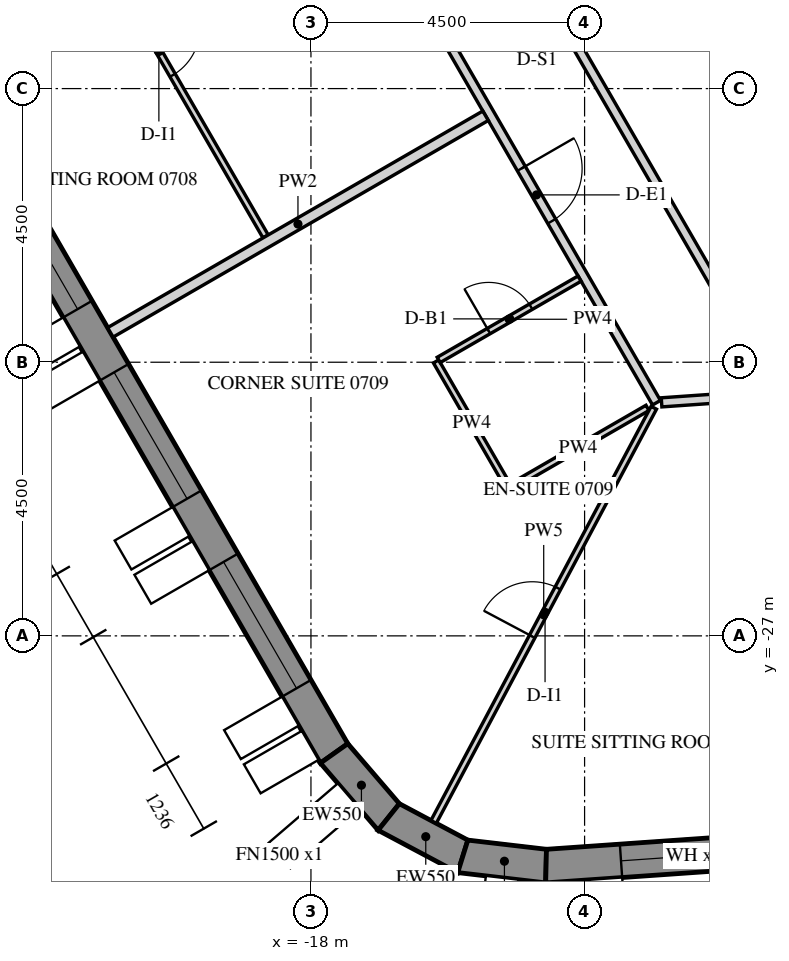
"""IFC4 building model, lengths in metres.
Left out: names, types, materials, properties, quantities, classifications, styles, units other than length and angle.
Written with IfcOpenShell. Run it as: python <this file> out.ifc"""

import sys

from ifc_helpers import new_model, si_unit, direction, frame, frame_2d, origin, place, context, subcontext, project, spatial, polyline, rectangle, outline, extrude, element, fill, save


model = new_model("IFC4")
c1 = context("Model", 3, precision=1e-05, world=origin(), true_north=direction((0.0, 1.0)))
c2 = subcontext(c1, "Body", "Model", "MODEL_VIEW")
j1 = project(units=[si_unit("LENGTHUNIT", "METRE"), si_unit("PLANEANGLEUNIT", "RADIAN")], contexts=[c1])
p1 = place(None, origin())
s1 = spatial("IfcSite", under=j1, at=p1, CompositionType="ELEMENT")
p2 = place(p1, origin())
s2 = spatial("IfcBuilding", under=s1, at=p2, CompositionType="ELEMENT")
p3 = place(p2, frame((0.0, 0.0, 99.9)))
s3 = spatial("IfcBuildingStorey", under=s2, at=p3, CompositionType="ELEMENT", Elevation=99.9)
p4 = place(p3, frame((-32.655, -2.89, -0.15), z_axis=(0.0, 0.0, 1.0), x_axis=(0.499997711317, -0.866026725152, 0.0)))
e1 = element("IfcWall", 1, at=p4, inside=s3, PredefinedType="SOLIDWALL", context=c2, shape_type="SweptSolid", body=[
    extrude(outline(polyline([(-0.022, -0.275), (30.097, -0.275), (30.045, 0.275), (0.022, 0.275), (-0.022, -0.275)])), origin(), (0.0, 0.0, 1.0), 3.9),
])
p5 = place(p4, frame((1.236, 0.0, 1.05)))
e2 = element("IfcOpeningElement", 2, at=p5, cuts=e1, PredefinedType="OPENING", context=c2, shape_type="SweptSolid", body=[
    extrude(rectangle(XDim=2.4, YDim=2.4, at=frame_2d((1.2, 1.2))), frame((0.0, 0.285, 0.0), z_axis=(0.0, -1.0, 0.0), x_axis=(1.0, 0.0, 0.0)), (0.0, 0.0, 1.0), 0.57),
])
p6 = place(p4, frame((4.835, 0.0, 1.05)))
e3 = element("IfcOpeningElement", 3, at=p6, cuts=e1, PredefinedType="OPENING", context=c2, shape_type="SweptSolid", body=[
    extrude(rectangle(XDim=2.4, YDim=2.4, at=frame_2d((1.2, 1.2))), frame((0.0, 0.285, 0.0), z_axis=(0.0, -1.0, 0.0), x_axis=(1.0, 0.0, 0.0)), (0.0, 0.0, 1.0), 0.57),
])
p7 = place(p4, frame((8.436, 0.0, 1.05)))
e4 = element("IfcOpeningElement", 4, at=p7, cuts=e1, PredefinedType="OPENING", context=c2, shape_type="SweptSolid", body=[
    extrude(rectangle(XDim=2.4, YDim=2.4, at=frame_2d((1.2, 1.2))), frame((0.0, 0.285, 0.0), z_axis=(0.0, -1.0, 0.0), x_axis=(1.0, 0.0, 0.0)), (0.0, 0.0, 1.0), 0.57),
])
p8 = place(p4, frame((12.035, 0.0, 1.05)))
e5 = element("IfcOpeningElement", 5, at=p8, cuts=e1, PredefinedType="OPENING", context=c2, shape_type="SweptSolid", body=[
    extrude(rectangle(XDim=2.4, YDim=2.4, at=frame_2d((1.2, 1.2))), frame((0.0, 0.285, 0.0), z_axis=(0.0, -1.0, 0.0), x_axis=(1.0, 0.0, 0.0)), (0.0, 0.0, 1.0), 0.57),
])
p9 = place(p4, frame((15.635, 0.0, 1.05)))
e6 = element("IfcOpeningElement", 6, at=p9, cuts=e1, PredefinedType="OPENING", context=c2, shape_type="SweptSolid", body=[
    extrude(rectangle(XDim=2.4, YDim=2.4, at=frame_2d((1.2, 1.2))), frame((0.0, 0.285, 0.0), z_axis=(0.0, -1.0, 0.0), x_axis=(1.0, 0.0, 0.0)), (0.0, 0.0, 1.0), 0.57),
])
p10 = place(p4, frame((19.236, 0.0, 1.05)))
e7 = element("IfcOpeningElement", 7, at=p10, cuts=e1, PredefinedType="OPENING", context=c2, shape_type="SweptSolid", body=[
    extrude(rectangle(XDim=2.4, YDim=2.4, at=frame_2d((1.2, 1.2))), frame((0.0, 0.285, 0.0), z_axis=(0.0, -1.0, 0.0), x_axis=(1.0, 0.0, 0.0)), (0.0, 0.0, 1.0), 0.57),
])
p11 = place(p4, frame((22.835, 0.0, 1.05)))
e8 = element("IfcOpeningElement", 8, at=p11, cuts=e1, PredefinedType="OPENING", context=c2, shape_type="SweptSolid", body=[
    extrude(rectangle(XDim=2.4, YDim=2.4, at=frame_2d((1.2, 1.2))), frame((0.0, 0.285, 0.0), z_axis=(0.0, -1.0, 0.0), x_axis=(1.0, 0.0, 0.0)), (0.0, 0.0, 1.0), 0.57),
])
p12 = place(p4, frame((26.436, 0.0, 1.05)))
e9 = element("IfcOpeningElement", 9, at=p12, cuts=e1, PredefinedType="OPENING", context=c2, shape_type="SweptSolid", body=[
    extrude(rectangle(XDim=2.4, YDim=2.4, at=frame_2d((1.2, 1.2))), frame((0.0, 0.285, 0.0), z_axis=(0.0, -1.0, 0.0), x_axis=(1.0, 0.0, 0.0)), (0.0, 0.0, 1.0), 0.57),
])
p13 = place(p3, frame((-17.619, -28.932, -0.15), z_axis=(0.0, 0.0, 1.0), x_axis=(0.651621950847, -0.758543890078, 0.0)))
e10 = element("IfcWall", 10, at=p13, inside=s3, PredefinedType="SOLIDWALL", context=c2, shape_type="SweptSolid", body=[
    extrude(outline(polyline([(-0.026, -0.275), (1.431, -0.275), (1.327, 0.275), (0.026, 0.275), (-0.026, -0.275)])), origin(), (0.0, 0.0, 1.0), 3.9),
])
p14 = place(p3, frame((-16.721, -29.979, -0.15), z_axis=(0.0, 0.0, 1.0), x_axis=(0.882994189209, -0.469383917304, 0.0)))
e11 = element("IfcWall", 11, at=p14, inside=s3, PredefinedType="SOLIDWALL", context=c2, shape_type="SweptSolid", body=[
    extrude(outline(polyline([(-0.052, -0.275), (1.431, -0.275), (1.327, 0.275), (0.052, 0.275), (-0.052, -0.275)])), origin(), (0.0, 0.0, 1.0), 3.9),
])
p15 = place(p3, frame((-15.503, -30.626, -0.15), z_axis=(0.0, 0.0, 1.0), x_axis=(0.993232537394, -0.11614269956, 0.0)))
e12 = element("IfcWall", 12, at=p15, inside=s3, PredefinedType="SOLIDWALL", context=c2, shape_type="SweptSolid", body=[
    extrude(outline(polyline([(-0.052, -0.275), (1.405, -0.275), (1.353, 0.275), (0.052, 0.275), (-0.052, -0.275)])), origin(), (0.0, 0.0, 1.0), 3.9),
])
p16 = place(p3, frame((-14.134, -30.786, -0.15), z_axis=(0.0, 0.0, 1.0), x_axis=(0.997564037441, 0.069756657061, 0.0)))
e13 = element("IfcWall", 13, at=p16, inside=s3, PredefinedType="SOLIDWALL", context=c2, shape_type="SweptSolid", body=[
    extrude(outline(polyline([(-0.026, -0.275), (30.094, -0.275), (30.049, 0.275), (0.026, 0.275), (-0.026, -0.275)])), origin(), (0.0, 0.0, 1.0), 3.9),
])
p17 = place(p16, frame((1.236, 0.0, 1.05)))
e14 = element("IfcOpeningElement", 14, at=p17, cuts=e13, PredefinedType="OPENING", context=c2, shape_type="SweptSolid", body=[
    extrude(rectangle(XDim=2.4, YDim=2.4, at=frame_2d((1.2, 1.2))), frame((0.0, 0.285, 0.0), z_axis=(0.0, -1.0, 0.0), x_axis=(1.0, 0.0, 0.0)), (0.0, 0.0, 1.0), 0.57),
])
p18 = place(p16, frame((4.835, 0.0, 1.05)))
e15 = element("IfcOpeningElement", 15, at=p18, cuts=e13, PredefinedType="OPENING", context=c2, shape_type="SweptSolid", body=[
    extrude(rectangle(XDim=2.4, YDim=2.4, at=frame_2d((1.2, 1.2))), frame((0.0, 0.285, 0.0), z_axis=(0.0, -1.0, 0.0), x_axis=(1.0, 0.0, 0.0)), (0.0, 0.0, 1.0), 0.57),
])
p19 = place(p16, frame((8.436, 0.0, 1.05)))
e16 = element("IfcOpeningElement", 16, at=p19, cuts=e13, PredefinedType="OPENING", context=c2, shape_type="SweptSolid", body=[
    extrude(rectangle(XDim=2.4, YDim=2.4, at=frame_2d((1.2, 1.2))), frame((0.0, 0.285, 0.0), z_axis=(0.0, -1.0, 0.0), x_axis=(1.0, 0.0, 0.0)), (0.0, 0.0, 1.0), 0.57),
])
p20 = place(p16, frame((12.035, 0.0, 1.05)))
e17 = element("IfcOpeningElement", 17, at=p20, cuts=e13, PredefinedType="OPENING", context=c2, shape_type="SweptSolid", body=[
    extrude(rectangle(XDim=2.4, YDim=2.4, at=frame_2d((1.2, 1.2))), frame((0.0, 0.285, 0.0), z_axis=(0.0, -1.0, 0.0), x_axis=(1.0, 0.0, 0.0)), (0.0, 0.0, 1.0), 0.57),
])
p21 = place(p16, frame((15.635, 0.0, 1.05)))
e18 = element("IfcOpeningElement", 18, at=p21, cuts=e13, PredefinedType="OPENING", context=c2, shape_type="SweptSolid", body=[
    extrude(rectangle(XDim=2.4, YDim=2.4, at=frame_2d((1.2, 1.2))), frame((0.0, 0.285, 0.0), z_axis=(0.0, -1.0, 0.0), x_axis=(1.0, 0.0, 0.0)), (0.0, 0.0, 1.0), 0.57),
])
p22 = place(p16, frame((19.236, 0.0, 1.05)))
e19 = element("IfcOpeningElement", 19, at=p22, cuts=e13, PredefinedType="OPENING", context=c2, shape_type="SweptSolid", body=[
    extrude(rectangle(XDim=2.4, YDim=2.4, at=frame_2d((1.2, 1.2))), frame((0.0, 0.285, 0.0), z_axis=(0.0, -1.0, 0.0), x_axis=(1.0, 0.0, 0.0)), (0.0, 0.0, 1.0), 0.57),
])
p23 = place(p16, frame((22.835, 0.0, 1.05)))
e20 = element("IfcOpeningElement", 20, at=p23, cuts=e13, PredefinedType="OPENING", context=c2, shape_type="SweptSolid", body=[
    extrude(rectangle(XDim=2.4, YDim=2.4, at=frame_2d((1.2, 1.2))), frame((0.0, 0.285, 0.0), z_axis=(0.0, -1.0, 0.0), x_axis=(1.0, 0.0, 0.0)), (0.0, 0.0, 1.0), 0.57),
])
p24 = place(p16, frame((26.436, 0.0, 1.05)))
e21 = element("IfcOpeningElement", 21, at=p24, cuts=e13, PredefinedType="OPENING", context=c2, shape_type="SweptSolid", body=[
    extrude(rectangle(XDim=2.4, YDim=2.4, at=frame_2d((1.2, 1.2))), frame((0.0, 0.285, 0.0), z_axis=(0.0, -1.0, 0.0), x_axis=(1.0, 0.0, 0.0)), (0.0, 0.0, 1.0), 0.57),
])
p25 = place(p3, frame((-24.436, -2.175, 0.0), z_axis=(0.0, 0.0, 1.0), x_axis=(0.499996816197, -0.866027241946, 0.0)))
e22 = element("IfcWall", 22, at=p25, inside=s3, PredefinedType="PARTITIONING", context=c2, shape_type="SweptSolid", body=[
    extrude(rectangle(XDim=24.238, YDim=0.15, at=frame_2d((12.119, 0.0))), origin(), (0.0, 0.0, 1.0), 2.988),
])
p26 = place(p25, frame((0.179, 0.0, 0.0)))
e23 = element("IfcOpeningElement", 23, at=p26, cuts=e22, PredefinedType="OPENING", context=c2, shape_type="SweptSolid", body=[
    extrude(rectangle(XDim=1.0, YDim=2.1, at=frame_2d((0.5, 1.05))), frame((0.0, 0.085, 0.0), z_axis=(0.0, -1.0, 0.0), x_axis=(1.0, 0.0, 0.0)), (0.0, 0.0, 1.0), 0.17),
])
p27 = place(p25, frame((12.246, 0.0, 0.0)))
e24 = element("IfcOpeningElement", 24, at=p27, cuts=e22, PredefinedType="OPENING", context=c2, shape_type="SweptSolid", body=[
    extrude(rectangle(XDim=1.0, YDim=2.1, at=frame_2d((0.5, 1.05))), frame((0.0, 0.085, 0.0), z_axis=(0.0, -1.0, 0.0), x_axis=(1.0, 0.0, 0.0)), (0.0, 0.0, 1.0), 0.17),
])
p28 = place(p25, frame((19.792, 0.0, 0.0)))
e25 = element("IfcOpeningElement", 25, at=p28, cuts=e22, PredefinedType="OPENING", context=c2, shape_type="SweptSolid", body=[
    extrude(rectangle(XDim=1.0, YDim=2.1, at=frame_2d((0.5, 1.05))), frame((0.0, 0.085, 0.0), z_axis=(0.0, -1.0, 0.0), x_axis=(1.0, 0.0, 0.0)), (0.0, 0.0, 1.0), 0.17),
])
p29 = place(p3, frame((-12.234, -23.16, 0.0), z_axis=(0.0, 0.0, 1.0), x_axis=(0.997563845372, 0.069759403714, 0.0)))
e26 = element("IfcWall", 26, at=p29, inside=s3, PredefinedType="PARTITIONING", context=c2, shape_type="SweptSolid", body=[
    extrude(rectangle(XDim=22.335, YDim=0.15, at=frame_2d((11.168, 0.0))), origin(), (0.0, 0.0, 1.0), 2.988),
])
p30 = place(p29, frame((5.409, 0.0, 0.0)))
e27 = element("IfcOpeningElement", 27, at=p30, cuts=e26, PredefinedType="OPENING", context=c2, shape_type="SweptSolid", body=[
    extrude(rectangle(XDim=1.0, YDim=2.1, at=frame_2d((0.5, 1.05))), frame((0.0, 0.085, 0.0), z_axis=(0.0, -1.0, 0.0), x_axis=(1.0, 0.0, 0.0)), (0.0, 0.0, 1.0), 0.17),
])
p31 = place(p29, frame((18.272, 0.0, 0.0)))
e28 = element("IfcOpeningElement", 28, at=p31, cuts=e26, PredefinedType="OPENING", context=c2, shape_type="SweptSolid", body=[
    extrude(rectangle(XDim=1.0, YDim=2.1, at=frame_2d((0.5, 1.05))), frame((0.0, 0.085, 0.0), z_axis=(0.0, -1.0, 0.0), x_axis=(1.0, 0.0, 0.0)), (0.0, 0.0, 1.0), 0.17),
])
p32 = place(p3, frame((-11.363, -21.219, 0.0), z_axis=(0.0, 0.0, 1.0), x_axis=(-0.50001451402, 0.866017023949, 0.0)))
e29 = element("IfcWall", 29, at=p32, inside=s3, PredefinedType="PARTITIONING", context=c2, shape_type="SweptSolid", body=[
    extrude(rectangle(XDim=11.674, YDim=0.15, at=frame_2d((5.837, 0.0))), origin(), (0.0, 0.0, 1.0), 2.988),
])
p33 = place(p32, frame((5.387, 0.0, 0.0)))
e30 = element("IfcOpeningElement", 30, at=p33, cuts=e29, PredefinedType="OPENING", context=c2, shape_type="SweptSolid", body=[
    extrude(rectangle(XDim=0.9, YDim=2.1, at=frame_2d((0.45, 1.05))), frame((0.0, 0.085, 0.0), z_axis=(0.0, -1.0, 0.0), x_axis=(1.0, 0.0, 0.0)), (0.0, 0.0, 1.0), 0.17),
])
p34 = place(p3, frame((-22.276, -14.317, 0.0), z_axis=(0.0, 0.0, 1.0), x_axis=(0.500010820671, -0.866019156377, 0.0)))
e31 = element("IfcWall", 31, at=p34, inside=s3, PredefinedType="PARTITIONING", context=c2, shape_type="SweptSolid", body=[
    extrude(rectangle(XDim=7.06, YDim=0.1, at=frame_2d((3.53, 0.0))), origin(), (0.0, 0.0, 1.0), 2.988),
])
p35 = place(p34, frame((3.1, 0.0, 0.0)))
e32 = element("IfcOpeningElement", 32, at=p35, cuts=e31, PredefinedType="OPENING", context=c2, shape_type="SweptSolid", body=[
    extrude(rectangle(XDim=0.9, YDim=2.1, at=frame_2d((0.45, 1.05))), frame((0.0, 0.06, 0.0), z_axis=(0.0, -1.0, 0.0), x_axis=(1.0, 0.0, 0.0)), (0.0, 0.0, 1.0), 0.12),
])
p36 = place(p3, frame((-21.299, -22.009, 0.0), z_axis=(0.0, 0.0, 1.0), x_axis=(0.866024672353, 0.500001266874, 0.0)))
e33 = element("IfcWall", 33, at=p36, inside=s3, PredefinedType="PARTITIONING", context=c2, shape_type="SweptSolid", body=[
    extrude(rectangle(XDim=7.125, YDim=0.18, at=frame_2d((3.562, 0.0))), origin(), (0.0, 0.0, 1.0), 2.988),
])
p37 = place(p3, frame((-12.466, -23.251, 0.0), z_axis=(0.0, 0.0, 1.0), x_axis=(-0.866017009382, -0.50001453925, 0.0)))
e34 = element("IfcWall", 34, at=p37, inside=s3, PredefinedType="PARTITIONING", context=c2, shape_type="SweptSolid", body=[
    extrude(rectangle(XDim=2.629, YDim=0.1, at=frame_2d((1.314, 0.0))), origin(), (0.0, 0.0, 1.0), 2.988),
])
p38 = place(p3, frame((-14.767, -24.522, 0.0), z_axis=(0.0, 0.0, 1.0), x_axis=(-0.499938297808, 0.866061024631, 0.0)))
e35 = element("IfcWall", 35, at=p38, inside=s3, PredefinedType="PARTITIONING", context=c2, shape_type="SweptSolid", body=[
    extrude(rectangle(XDim=2.35, YDim=0.1, at=frame_2d((1.175, 0.0))), origin(), (0.0, 0.0, 1.0), 2.988),
])
p39 = place(p3, frame((-15.899, -22.462, 0.0), z_axis=(0.0, 0.0, 1.0), x_axis=(0.86604424267, 0.499967368674, 0.0)))
e36 = element("IfcWall", 36, at=p39, inside=s3, PredefinedType="PARTITIONING", context=c2, shape_type="SweptSolid", body=[
    extrude(rectangle(XDim=2.675, YDim=0.1, at=frame_2d((1.337, 0.0))), origin(), (0.0, 0.0, 1.0), 2.988),
])
p40 = place(p39, frame((0.95, 0.0, 0.0)))
e37 = element("IfcOpeningElement", 37, at=p40, cuts=e36, PredefinedType="OPENING", context=c2, shape_type="SweptSolid", body=[
    extrude(rectangle(XDim=0.8, YDim=2.1, at=frame_2d((0.4, 1.05))), frame((0.0, 0.06, 0.0), z_axis=(0.0, -1.0, 0.0), x_axis=(1.0, 0.0, 0.0)), (0.0, 0.0, 1.0), 0.12),
])
p41 = place(p3, frame((-15.983, -30.059, 0.0), z_axis=(0.0, 0.0, 1.0), x_axis=(0.469495384778, 0.882934926069, 0.0)))
e38 = element("IfcWall", 38, at=p41, inside=s3, PredefinedType="PARTITIONING", context=c2, shape_type="SweptSolid", body=[
    extrude(rectangle(XDim=7.713, YDim=0.1, at=frame_2d((3.856, 0.0))), origin(), (0.0, 0.0, 1.0), 2.988),
])
p42 = place(p41, frame((3.454, 0.0, 0.0)))
e39 = element("IfcOpeningElement", 39, at=p42, cuts=e38, PredefinedType="OPENING", context=c2, shape_type="SweptSolid", body=[
    extrude(rectangle(XDim=0.9, YDim=2.1, at=frame_2d((0.45, 1.05))), frame((0.0, 0.06, 0.0), z_axis=(0.0, -1.0, 0.0), x_axis=(1.0, 0.0, 0.0)), (0.0, 0.0, 1.0), 0.12),
])
p43 = place(p10, frame((0.0, 0.205, 0.0)))
e40 = element("IfcWindow", 40, at=p43, inside=s3, PartitioningType="DOUBLE_PANEL_VERTICAL", PredefinedType="WINDOW", context=c2, shape_type="SweptSolid", body=[
    extrude(rectangle(XDim=2.4, YDim=2.4, at=frame_2d((1.2, 1.2))), frame((0.0, 0.03, 0.0), z_axis=(0.0, -1.0, 0.0), x_axis=(1.0, 0.0, 0.0)), (0.0, 0.0, 1.0), 0.06),
])
fill(e7, e40)
p44 = place(p11, frame((0.0, 0.205, 0.0)))
e41 = element("IfcWindow", 41, at=p44, inside=s3, PartitioningType="DOUBLE_PANEL_VERTICAL", PredefinedType="WINDOW", context=c2, shape_type="SweptSolid", body=[
    extrude(rectangle(XDim=2.4, YDim=2.4, at=frame_2d((1.2, 1.2))), frame((0.0, 0.03, 0.0), z_axis=(0.0, -1.0, 0.0), x_axis=(1.0, 0.0, 0.0)), (0.0, 0.0, 1.0), 0.06),
])
fill(e8, e41)
p45 = place(p12, frame((0.0, 0.205, 0.0)))
e42 = element("IfcWindow", 42, at=p45, inside=s3, PartitioningType="DOUBLE_PANEL_VERTICAL", PredefinedType="WINDOW", context=c2, shape_type="SweptSolid", body=[
    extrude(rectangle(XDim=2.4, YDim=2.4, at=frame_2d((1.2, 1.2))), frame((0.0, 0.03, 0.0), z_axis=(0.0, -1.0, 0.0), x_axis=(1.0, 0.0, 0.0)), (0.0, 0.0, 1.0), 0.06),
])
fill(e9, e42)
p46 = place(p17, frame((0.0, 0.205, 0.0)))
e43 = element("IfcWindow", 43, at=p46, inside=s3, PartitioningType="DOUBLE_PANEL_VERTICAL", PredefinedType="WINDOW", context=c2, shape_type="SweptSolid", body=[
    extrude(rectangle(XDim=2.4, YDim=2.4, at=frame_2d((1.2, 1.2))), frame((0.0, 0.03, 0.0), z_axis=(0.0, -1.0, 0.0), x_axis=(1.0, 0.0, 0.0)), (0.0, 0.0, 1.0), 0.06),
])
fill(e14, e43)
p47 = place(p35, origin())
e44 = element("IfcDoor", 44, at=p47, inside=s3, OperationType="SINGLE_SWING_LEFT", PredefinedType="DOOR", context=c2, shape_type="SweptSolid", body=[
    extrude(rectangle(XDim=0.9, YDim=2.1, at=frame_2d((0.45, 1.05))), frame((0.0, 0.025, 0.0), z_axis=(0.0, -1.0, 0.0), x_axis=(1.0, 0.0, 0.0)), (0.0, 0.0, 1.0), 0.05),
])
fill(e32, e44)
p48 = place(p28, origin())
e45 = element("IfcDoor", 45, at=p48, inside=s3, OperationType="SINGLE_SWING_RIGHT", PredefinedType="DOOR", context=c2, shape_type="SweptSolid", body=[
    extrude(rectangle(XDim=1.0, YDim=2.1, at=frame_2d((0.5, 1.05))), frame((0.0, 0.025, 0.0), z_axis=(0.0, -1.0, 0.0), x_axis=(1.0, 0.0, 0.0)), (0.0, 0.0, 1.0), 0.05),
])
fill(e25, e45)
p49 = place(p40, origin())
e46 = element("IfcDoor", 46, at=p49, inside=s3, OperationType="SINGLE_SWING_RIGHT", PredefinedType="DOOR", context=c2, shape_type="SweptSolid", body=[
    extrude(rectangle(XDim=0.8, YDim=2.1, at=frame_2d((0.4, 1.05))), frame((0.0, 0.025, 0.0), z_axis=(0.0, -1.0, 0.0), x_axis=(1.0, 0.0, 0.0)), (0.0, 0.0, 1.0), 0.05),
])
fill(e37, e46)
p50 = place(p42, origin())
e47 = element("IfcDoor", 47, at=p50, inside=s3, OperationType="SINGLE_SWING_LEFT", PredefinedType="DOOR", context=c2, shape_type="SweptSolid", body=[
    extrude(rectangle(XDim=0.9, YDim=2.1, at=frame_2d((0.45, 1.05))), frame((0.0, 0.025, 0.0), z_axis=(0.0, -1.0, 0.0), x_axis=(1.0, 0.0, 0.0)), (0.0, 0.0, 1.0), 0.05),
])
fill(e39, e47)
save(model, sys.argv[1])
